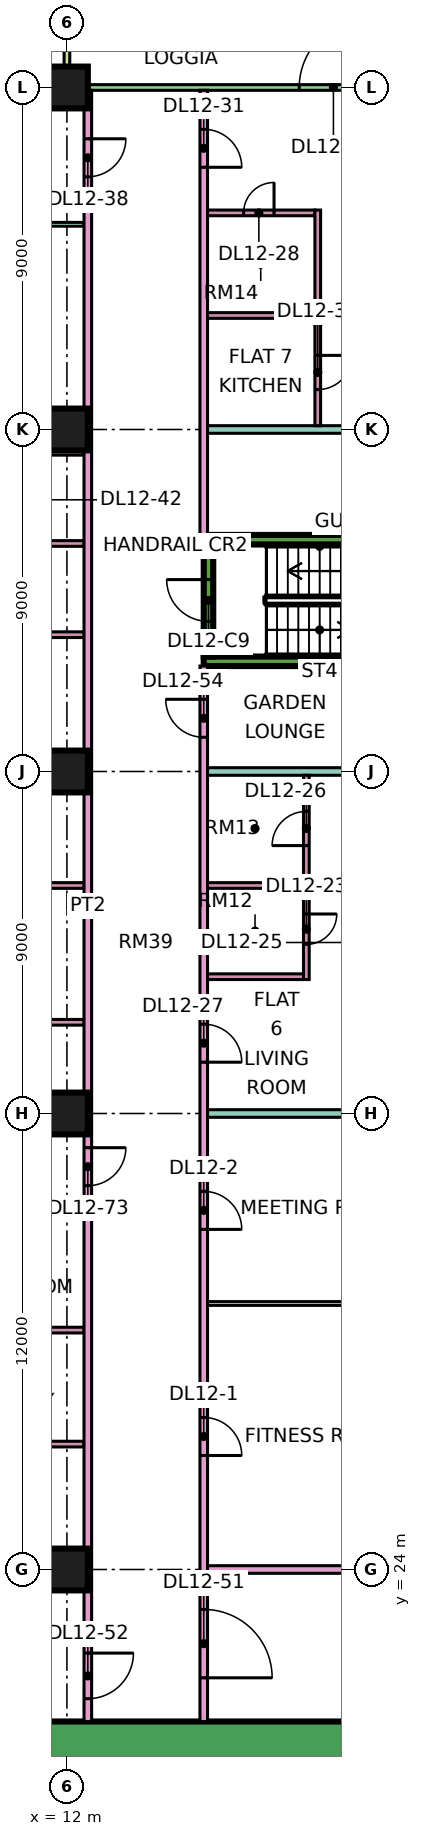
"""IFC4 building model, lengths in metres.
Left out: names, types, materials, properties, quantities, classifications, styles, units other than length and angle.
Written with IfcOpenShell. Run it as: python <this file> out.ifc"""

import sys

from ifc_helpers import new_model, si_unit, direction, frame, frame_2d, origin, origin_2d, place, context, subcontext, project, spatial, rectangle, extrude, element, fill, save


model = new_model("IFC4")
c1 = context("Model", 3, precision=1e-05, world=origin(), true_north=direction((0.0, 1.0)))
c2 = subcontext(c1, "Body", "Model", "MODEL_VIEW")
j1 = project(units=[si_unit("LENGTHUNIT", "METRE"), si_unit("PLANEANGLEUNIT", "RADIAN")], contexts=[c1])
p1 = place(None, origin())
s1 = spatial("IfcSite", under=j1, at=p1, CompositionType="ELEMENT")
p2 = place(p1, origin())
s2 = spatial("IfcBuilding", under=s1, at=p2, CompositionType="ELEMENT")
p3 = place(p2, frame((0.0, 0.0, 60.15)))
s3 = spatial("IfcBuildingStorey", under=s2, at=p3, CompositionType="ELEMENT", Elevation=60.15)
for number, where, z_axis, x_axis in (
    (1, (12.0, 24.0, 0.0), (0.0, 0.0, 1.0), (1.0, 0.0, 0.0)),
    (2, (12.0, 36.0, 0.0), (0.0, 0.0, 1.0), (1.0, 0.0, 0.0)),
    (3, (12.0, 45.0, 0.0), (0.0, 0.0, 1.0), (1.0, 0.0, 0.0)),
    (4, (12.0, 54.0, 0.0), (0.0, 0.0, 1.0), (1.0, 0.0, 0.0)),
    (5, (12.0, 63.0, 0.0), (0.0, 0.0, 1.0), (1.0, 0.0, 0.0)),
):
    element("IfcColumn", number, at=place(p3, frame(where, z_axis=z_axis, x_axis=x_axis)), inside=s3, PredefinedType="COLUMN", context=c2, shape_type="SweptSolid", body=[
        extrude(rectangle(XDim=1.1, YDim=1.1, at=origin_2d()), origin(), (0.0, 0.0, 1.0), 3.75),
    ])
p4 = place(p3, frame((9.0, 19.45, 0.0), z_axis=(0.0, 0.0, 1.0), x_axis=(1.0, 0.0, 0.0)))
e6 = element("IfcWall", 6, at=p4, inside=s3, PredefinedType="SHEAR", context=c2, shape_type="SweptSolid", body=[
    extrude(rectangle(XDim=25.0, YDim=1.1, at=frame_2d((12.5, 0.0))), origin(), (0.0, 0.0, 1.0), 3.75),
])
p5 = place(p4, frame((19.1, 0.0, 0.0)))
e7 = element("IfcOpeningElement", 7, at=p5, cuts=e6, PredefinedType="OPENING", context=c2, shape_type="SweptSolid", body=[
    extrude(rectangle(XDim=1.8, YDim=2.4, at=frame_2d((0.9, 1.2))), frame((0.0, 0.56, 0.0), z_axis=(0.0, -1.0, 0.0), x_axis=(1.0, 0.0, 0.0)), (0.0, 0.0, 1.0), 1.12),
])
for number, where, z_axis, x_axis in (
    (8, (15.6, 47.9, 0.0), (0.0, 0.0, 1.0), (1.0, 0.0, 0.0)),
    (9, (15.6, 51.1, 0.0), (0.0, 0.0, 1.0), (1.0, 0.0, 0.0)),
):
    element("IfcWall", number, at=place(p3, frame(where, z_axis=z_axis, x_axis=x_axis)), inside=s3, PredefinedType="SHEAR", context=c2, shape_type="SweptSolid", body=[
        extrude(rectangle(XDim=7.0, YDim=0.25, at=frame_2d((3.5, 0.0))), origin(), (0.0, 0.0, 1.0), 3.75),
    ])
p6 = place(p3, frame((15.725, 48.025, 0.0), z_axis=(0.0, 0.0, 1.0), x_axis=(0.0, 1.0, 0.0)))
e10 = element("IfcWall", 10, at=p6, inside=s3, PredefinedType="SHEAR", context=c2, shape_type="SweptSolid", body=[
    extrude(rectangle(XDim=2.95, YDim=0.25, at=frame_2d((1.475, 0.0))), origin(), (0.0, 0.0, 1.0), 3.75),
])
p7 = place(p6, frame((0.925, 0.0, 0.0)))
e11 = element("IfcOpeningElement", 11, at=p7, cuts=e10, PredefinedType="OPENING", context=c2, shape_type="SweptSolid", body=[
    extrude(rectangle(XDim=1.1, YDim=2.2, at=frame_2d((0.55, 1.1))), frame((0.0, 0.135, 0.0), z_axis=(0.0, -1.0, 0.0), x_axis=(1.0, 0.0, 0.0)), (0.0, 0.0, 1.0), 0.27),
])
p8 = place(p3, frame((22.425, 63.0, 0.0), z_axis=(0.0, 0.0, 1.0), x_axis=(-1.0, 0.0, 0.0)))
e12 = element("IfcWall", 12, at=p8, inside=s3, PredefinedType="SOLIDWALL", context=c2, shape_type="SweptSolid", body=[
    extrude(rectangle(XDim=10.35, YDim=0.15, at=frame_2d((5.175, 0.0))), origin(), (0.0, 0.0, 1.0), 3.35),
])
p9 = place(p8, frame((2.512, 0.0, 0.0)))
e13 = element("IfcOpeningElement", 13, at=p9, cuts=e12, PredefinedType="OPENING", context=c2, shape_type="SweptSolid", body=[
    extrude(rectangle(XDim=1.8, YDim=2.4, at=frame_2d((0.9, 1.2))), frame((0.0, 0.085, 0.0), z_axis=(0.0, -1.0, 0.0), x_axis=(1.0, 0.0, 0.0)), (0.0, 0.0, 1.0), 0.17),
])
p10 = place(p3, frame((12.0, 64.5, 0.0), z_axis=(0.0, 0.0, 1.0), x_axis=(0.0, -1.0, 0.0)))
e14 = element("IfcWall", 14, at=p10, inside=s3, PredefinedType="SOLIDWALL", context=c2, shape_type="SweptSolid", body=[
    extrude(rectangle(XDim=1.5, YDim=0.15, at=frame_2d((0.75, 0.0))), origin(), (0.0, 0.0, 1.0), 3.35),
])
p11 = place(p3, frame((0.0, 36.0, 0.0), z_axis=(0.0, 0.0, 1.0), x_axis=(1.0, 0.0, 0.0)))
e15 = element("IfcWall", 15, at=p11, inside=s3, PredefinedType="PARTITIONING", context=c2, shape_type="SweptSolid", body=[
    extrude(rectangle(XDim=12.45, YDim=0.2, at=frame_2d((6.225, 0.0))), origin(), (0.0, 0.0, 1.0), 3.35),
])
p12 = place(p3, frame((0.074, 22.4, 0.0), z_axis=(0.0, 0.0, 1.0), x_axis=(1.0, 0.0, 0.0)))
e16 = element("IfcWall", 16, at=p12, inside=s3, PredefinedType="PARTITIONING", context=c2, shape_type="SweptSolid", body=[
    extrude(rectangle(XDim=12.376, YDim=0.2, at=frame_2d((6.188, 0.0))), origin(), (0.0, 0.0, 1.0), 3.35),
])
for number, where, z_axis, x_axis in (
    (17, (7.225, 38.4, 0.0), (0.0, 0.0, 1.0), (1.0, 0.0, 0.0)),
    (18, (7.225, 42.0, 0.0), (0.0, 0.0, 1.0), (1.0, 0.0, 0.0)),
    (19, (7.225, 45.0, 0.0), (0.0, 0.0, 1.0), (1.0, 0.0, 0.0)),
    (20, (7.225, 48.6, 0.0), (0.0, 0.0, 1.0), (1.0, 0.0, 0.0)),
    (21, (7.225, 51.0, 0.0), (0.0, 0.0, 1.0), (1.0, 0.0, 0.0)),
    (22, (7.225, 53.4, 0.0), (0.0, 0.0, 1.0), (1.0, 0.0, 0.0)),
):
    element("IfcWall", number, at=place(p3, frame(where, z_axis=z_axis, x_axis=x_axis)), inside=s3, PredefinedType="PARTITIONING", context=c2, shape_type="SweptSolid", body=[
        extrude(rectangle(XDim=5.225, YDim=0.15, at=frame_2d((2.612, 0.0))), origin(), (0.0, 0.0, 1.0), 3.35),
    ])
p13 = place(p3, frame((7.225, 59.4, 0.0), z_axis=(0.0, 0.0, 1.0), x_axis=(1.0, 0.0, 0.0)))
e23 = element("IfcWall", 23, at=p13, inside=s3, PredefinedType="PARTITIONING", context=c2, shape_type="SweptSolid", body=[
    extrude(rectangle(XDim=5.225, YDim=0.1, at=frame_2d((2.612, 0.0))), origin(), (0.0, 0.0, 1.0), 3.35),
])
for number, where, z_axis, x_axis in (
    (24, (8.425, 27.3, 0.0), (0.0, 0.0, 1.0), (1.0, 0.0, 0.0)),
    (25, (8.425, 30.3, 0.0), (0.0, 0.0, 1.0), (1.0, 0.0, 0.0)),
    (26, (8.425, 33.3, 0.0), (0.0, 0.0, 1.0), (1.0, 0.0, 0.0)),
):
    element("IfcWall", number, at=place(p3, frame(where, z_axis=z_axis, x_axis=x_axis)), inside=s3, PredefinedType="PARTITIONING", context=c2, shape_type="SweptSolid", body=[
        extrude(rectangle(XDim=4.025, YDim=0.15, at=frame_2d((2.012, 0.0))), origin(), (0.0, 0.0, 1.0), 3.35),
    ])
p14 = place(p3, frame((12.55, 20.0, 0.0), z_axis=(0.0, 0.0, 1.0), x_axis=(0.0, 1.0, 0.0)))
e27 = element("IfcWall", 27, at=p14, inside=s3, PredefinedType="PARTITIONING", context=c2, shape_type="SweptSolid", body=[
    extrude(rectangle(XDim=42.926, YDim=0.2, at=frame_2d((21.463, 0.0))), origin(), (0.0, 0.0, 1.0), 3.35),
])
p15 = place(p14, frame((40.65, 0.0, 0.0)))
e28 = element("IfcOpeningElement", 28, at=p15, cuts=e27, PredefinedType="OPENING", context=c2, shape_type="SweptSolid", body=[
    extrude(rectangle(XDim=1.0, YDim=2.1, at=frame_2d((0.5, 1.05))), frame((0.0, 0.11, 0.0), z_axis=(0.0, -1.0, 0.0), x_axis=(1.0, 0.0, 0.0)), (0.0, 0.0, 1.0), 0.22),
])
p16 = place(p14, frame((0.6, 0.0, 0.0)))
e29 = element("IfcOpeningElement", 29, at=p16, cuts=e27, PredefinedType="OPENING", context=c2, shape_type="SweptSolid", body=[
    extrude(rectangle(XDim=1.2, YDim=2.1, at=frame_2d((0.6, 1.05))), frame((0.0, 0.11, 0.0), z_axis=(0.0, -1.0, 0.0), x_axis=(1.0, 0.0, 0.0)), (0.0, 0.0, 1.0), 0.22),
])
p17 = place(p14, frame((14.1, 0.0, 0.0)))
e30 = element("IfcOpeningElement", 30, at=p17, cuts=e27, PredefinedType="OPENING", context=c2, shape_type="SweptSolid", body=[
    extrude(rectangle(XDim=1.0, YDim=2.1, at=frame_2d((0.5, 1.05))), frame((0.0, 0.11, 0.0), z_axis=(0.0, -1.0, 0.0), x_axis=(1.0, 0.0, 0.0)), (0.0, 0.0, 1.0), 0.22),
])
p18 = place(p3, frame((15.6, 20.0, 0.0), z_axis=(0.0, 0.0, 1.0), x_axis=(0.0, 1.0, 0.0)))
e31 = element("IfcWall", 31, at=p18, inside=s3, PredefinedType="PARTITIONING", context=c2, shape_type="SweptSolid", body=[
    extrude(rectangle(XDim=27.775, YDim=0.2, at=frame_2d((13.887, 0.0))), origin(), (0.0, 0.0, 1.0), 3.35),
])
p19 = place(p18, frame((7.0, 0.0, 0.0)))
e32 = element("IfcOpeningElement", 32, at=p19, cuts=e31, PredefinedType="OPENING", context=c2, shape_type="SweptSolid", body=[
    extrude(rectangle(XDim=1.0, YDim=2.1, at=frame_2d((0.5, 1.05))), frame((0.0, 0.11, 0.0), z_axis=(0.0, -1.0, 0.0), x_axis=(1.0, 0.0, 0.0)), (0.0, 0.0, 1.0), 0.22),
])
p20 = place(p18, frame((12.95, 0.0, 0.0)))
e33 = element("IfcOpeningElement", 33, at=p20, cuts=e31, PredefinedType="OPENING", context=c2, shape_type="SweptSolid", body=[
    extrude(rectangle(XDim=1.0, YDim=2.1, at=frame_2d((0.5, 1.05))), frame((0.0, 0.11, 0.0), z_axis=(0.0, -1.0, 0.0), x_axis=(1.0, 0.0, 0.0)), (0.0, 0.0, 1.0), 0.22),
])
p21 = place(p18, frame((17.35, 0.0, 0.0)))
e34 = element("IfcOpeningElement", 34, at=p21, cuts=e31, PredefinedType="OPENING", context=c2, shape_type="SweptSolid", body=[
    extrude(rectangle(XDim=1.0, YDim=2.1, at=frame_2d((0.5, 1.05))), frame((0.0, 0.11, 0.0), z_axis=(0.0, -1.0, 0.0), x_axis=(1.0, 0.0, 0.0)), (0.0, 0.0, 1.0), 0.22),
])
p22 = place(p18, frame((1.15, 0.0, 0.0)))
e35 = element("IfcOpeningElement", 35, at=p22, cuts=e31, PredefinedType="OPENING", context=c2, shape_type="SweptSolid", body=[
    extrude(rectangle(XDim=1.8, YDim=2.1, at=frame_2d((0.9, 1.05))), frame((0.0, 0.11, 0.0), z_axis=(0.0, -1.0, 0.0), x_axis=(1.0, 0.0, 0.0)), (0.0, 0.0, 1.0), 0.22),
])
p23 = place(p18, frame((25.9, 0.0, 0.0)))
e36 = element("IfcOpeningElement", 36, at=p23, cuts=e31, PredefinedType="OPENING", context=c2, shape_type="SweptSolid", body=[
    extrude(rectangle(XDim=1.0, YDim=2.1, at=frame_2d((0.5, 1.05))), frame((0.0, 0.11, 0.0), z_axis=(0.0, -1.0, 0.0), x_axis=(1.0, 0.0, 0.0)), (0.0, 0.0, 1.0), 0.22),
])
p24 = place(p3, frame((15.6, 51.225, 0.0), z_axis=(0.0, 0.0, 1.0), x_axis=(0.0, 1.0, 0.0)))
e37 = element("IfcWall", 37, at=p24, inside=s3, PredefinedType="PARTITIONING", context=c2, shape_type="SweptSolid", body=[
    extrude(rectangle(XDim=11.701, YDim=0.2, at=frame_2d((5.851, 0.0))), origin(), (0.0, 0.0, 1.0), 3.35),
])
p25 = place(p24, frame((9.675, 0.0, 0.0)))
e38 = element("IfcOpeningElement", 38, at=p25, cuts=e37, PredefinedType="OPENING", context=c2, shape_type="SweptSolid", body=[
    extrude(rectangle(XDim=1.0, YDim=2.1, at=frame_2d((0.5, 1.05))), frame((0.0, 0.11, 0.0), z_axis=(0.0, -1.0, 0.0), x_axis=(1.0, 0.0, 0.0)), (0.0, 0.0, 1.0), 0.22),
])
p26 = place(p3, frame((15.7, 24.0, 0.0), z_axis=(0.0, 0.0, 1.0), x_axis=(1.0, 0.0, 0.0)))
e39 = element("IfcWall", 39, at=p26, inside=s3, PredefinedType="PARTITIONING", context=c2, shape_type="SweptSolid", body=[
    extrude(rectangle(XDim=5.8, YDim=0.2, at=frame_2d((2.9, 0.0))), origin(), (0.0, 0.0, 1.0), 3.35),
])
p27 = place(p3, frame((15.7, 31.0, 0.0), z_axis=(0.0, 0.0, 1.0), x_axis=(1.0, 0.0, 0.0)))
e40 = element("IfcWall", 40, at=p27, inside=s3, PredefinedType="PARTITIONING", context=c2, shape_type="SweptSolid", body=[
    extrude(rectangle(XDim=5.8, YDim=0.1, at=frame_2d((2.9, 0.0))), origin(), (0.0, 0.0, 1.0), 3.35),
])
p28 = place(p3, frame((15.7, 36.0, 0.0), z_axis=(0.0, 0.0, 1.0), x_axis=(1.0, 0.0, 0.0)))
e41 = element("IfcWall", 41, at=p28, inside=s3, PredefinedType="PARTITIONING", context=c2, shape_type="SweptSolid", body=[
    extrude(rectangle(XDim=8.3, YDim=0.2, at=frame_2d((4.15, 0.0))), origin(), (0.0, 0.0, 1.0), 3.35),
])
for number, where, z_axis, x_axis in (
    (42, (15.7, 39.6, 0.0), (0.0, 0.0, 1.0), (1.0, 0.0, 0.0)),
    (43, (15.7, 42.0, 0.0), (0.0, 0.0, 1.0), (1.0, 0.0, 0.0)),
):
    element("IfcWall", number, at=place(p3, frame(where, z_axis=z_axis, x_axis=x_axis)), inside=s3, PredefinedType="PARTITIONING", context=c2, shape_type="SweptSolid", body=[
        extrude(rectangle(XDim=2.525, YDim=0.15, at=frame_2d((1.263, 0.0))), origin(), (0.0, 0.0, 1.0), 3.35),
    ])
p29 = place(p3, frame((15.7, 45.0, 0.0), z_axis=(0.0, 0.0, 1.0), x_axis=(1.0, 0.0, 0.0)))
e44 = element("IfcWall", 44, at=p29, inside=s3, PredefinedType="PARTITIONING", context=c2, shape_type="SweptSolid", body=[
    extrude(rectangle(XDim=8.226, YDim=0.2, at=frame_2d((4.113, 0.0))), origin(), (0.0, 0.0, 1.0), 3.35),
])
p30 = place(p3, frame((15.7, 54.0, 0.0), z_axis=(0.0, 0.0, 1.0), x_axis=(1.0, 0.0, 0.0)))
e45 = element("IfcWall", 45, at=p30, inside=s3, PredefinedType="PARTITIONING", context=c2, shape_type="SweptSolid", body=[
    extrude(rectangle(XDim=8.3, YDim=0.2, at=frame_2d((4.15, 0.0))), origin(), (0.0, 0.0, 1.0), 3.35),
])
p31 = place(p3, frame((15.7, 57.0, 0.0), z_axis=(0.0, 0.0, 1.0), x_axis=(1.0, 0.0, 0.0)))
e46 = element("IfcWall", 46, at=p31, inside=s3, PredefinedType="PARTITIONING", context=c2, shape_type="SweptSolid", body=[
    extrude(rectangle(XDim=2.825, YDim=0.15, at=frame_2d((1.413, 0.0))), origin(), (0.0, 0.0, 1.0), 3.35),
])
p32 = place(p3, frame((15.7, 59.7, 0.0), z_axis=(0.0, 0.0, 1.0), x_axis=(1.0, 0.0, 0.0)))
e47 = element("IfcWall", 47, at=p32, inside=s3, PredefinedType="PARTITIONING", context=c2, shape_type="SweptSolid", body=[
    extrude(rectangle(XDim=2.825, YDim=0.15, at=frame_2d((1.413, 0.0))), origin(), (0.0, 0.0, 1.0), 3.35),
])
p33 = place(p32, frame((0.95, 0.0, 0.0)))
e48 = element("IfcOpeningElement", 48, at=p33, cuts=e47, PredefinedType="OPENING", context=c2, shape_type="SweptSolid", body=[
    extrude(rectangle(XDim=0.8, YDim=2.1, at=frame_2d((0.4, 1.05))), frame((0.0, 0.085, 0.0), z_axis=(0.0, -1.0, 0.0), x_axis=(1.0, 0.0, 0.0)), (0.0, 0.0, 1.0), 0.17),
])
p34 = place(p3, frame((18.3, 39.525, 0.0), z_axis=(0.0, 0.0, 1.0), x_axis=(0.0, 1.0, 0.0)))
e49 = element("IfcWall", 49, at=p34, inside=s3, PredefinedType="PARTITIONING", context=c2, shape_type="SweptSolid", body=[
    extrude(rectangle(XDim=5.375, YDim=0.15, at=frame_2d((2.688, 0.0))), origin(), (0.0, 0.0, 1.0), 3.35),
])
p35 = place(p34, frame((0.925, 0.0, 0.0)))
e50 = element("IfcOpeningElement", 50, at=p35, cuts=e49, PredefinedType="OPENING", context=c2, shape_type="SweptSolid", body=[
    extrude(rectangle(XDim=0.8, YDim=2.1, at=frame_2d((0.4, 1.05))), frame((0.0, 0.085, 0.0), z_axis=(0.0, -1.0, 0.0), x_axis=(1.0, 0.0, 0.0)), (0.0, 0.0, 1.0), 0.17),
])
p36 = place(p34, frame((3.525, 0.0, 0.0)))
e51 = element("IfcOpeningElement", 51, at=p36, cuts=e49, PredefinedType="OPENING", context=c2, shape_type="SweptSolid", body=[
    extrude(rectangle(XDim=0.9, YDim=2.1, at=frame_2d((0.45, 1.05))), frame((0.0, 0.085, 0.0), z_axis=(0.0, -1.0, 0.0), x_axis=(1.0, 0.0, 0.0)), (0.0, 0.0, 1.0), 0.17),
])
p37 = place(p3, frame((18.6, 54.1, 0.0), z_axis=(0.0, 0.0, 1.0), x_axis=(0.0, 1.0, 0.0)))
e52 = element("IfcWall", 52, at=p37, inside=s3, PredefinedType="PARTITIONING", context=c2, shape_type="SweptSolid", body=[
    extrude(rectangle(XDim=5.675, YDim=0.15, at=frame_2d((2.837, 0.0))), origin(), (0.0, 0.0, 1.0), 3.35),
])
p38 = place(p37, frame((0.95, 0.0, 0.0)))
e53 = element("IfcOpeningElement", 53, at=p38, cuts=e52, PredefinedType="OPENING", context=c2, shape_type="SweptSolid", body=[
    extrude(rectangle(XDim=0.9, YDim=2.1, at=frame_2d((0.45, 1.05))), frame((0.0, 0.085, 0.0), z_axis=(0.0, -1.0, 0.0), x_axis=(1.0, 0.0, 0.0)), (0.0, 0.0, 1.0), 0.17),
])
p39 = place(p9, frame((1.8, 0.0, 0.0), z_axis=(0.0, 0.0, 1.0), x_axis=(-1.0, 0.0, 0.0)))
e54 = element("IfcDoor", 54, at=p39, inside=s3, OperationType="DOUBLE_DOOR_SINGLE_SWING", PredefinedType="DOOR", context=c2, shape_type="SweptSolid", body=[
    extrude(rectangle(XDim=1.8, YDim=2.4, at=frame_2d((0.9, 1.2))), frame((0.0, 0.025, 0.0), z_axis=(0.0, -1.0, 0.0), x_axis=(1.0, 0.0, 0.0)), (0.0, 0.0, 1.0), 0.05),
])
fill(e13, e54)
p40 = place(p7, frame((1.1, 0.0, 0.0), z_axis=(0.0, 0.0, 1.0), x_axis=(-1.0, 0.0, 0.0)))
e55 = element("IfcDoor", 55, at=p40, inside=s3, OperationType="SINGLE_SWING_RIGHT", PredefinedType="DOOR", context=c2, shape_type="SweptSolid", body=[
    extrude(rectangle(XDim=1.1, YDim=2.2, at=frame_2d((0.55, 1.1))), frame((0.0, 0.025, 0.0), z_axis=(0.0, -1.0, 0.0), x_axis=(1.0, 0.0, 0.0)), (0.0, 0.0, 1.0), 0.05),
])
fill(e11, e55)
p41 = place(p19, frame((1.0, 0.0, 0.0), z_axis=(0.0, 0.0, 1.0), x_axis=(-1.0, 0.0, 0.0)))
e56 = element("IfcDoor", 56, at=p41, inside=s3, OperationType="SINGLE_SWING_LEFT", PredefinedType="DOOR", context=c2, shape_type="SweptSolid", body=[
    extrude(rectangle(XDim=1.0, YDim=2.1, at=frame_2d((0.5, 1.05))), frame((0.0, 0.025, 0.0), z_axis=(0.0, -1.0, 0.0), x_axis=(1.0, 0.0, 0.0)), (0.0, 0.0, 1.0), 0.05),
])
fill(e32, e56)
p42 = place(p20, frame((1.0, 0.0, 0.0), z_axis=(0.0, 0.0, 1.0), x_axis=(-1.0, 0.0, 0.0)))
e57 = element("IfcDoor", 57, at=p42, inside=s3, OperationType="SINGLE_SWING_LEFT", PredefinedType="DOOR", context=c2, shape_type="SweptSolid", body=[
    extrude(rectangle(XDim=1.0, YDim=2.1, at=frame_2d((0.5, 1.05))), frame((0.0, 0.025, 0.0), z_axis=(0.0, -1.0, 0.0), x_axis=(1.0, 0.0, 0.0)), (0.0, 0.0, 1.0), 0.05),
])
fill(e33, e57)
p43 = place(p35, origin())
e58 = element("IfcDoor", 58, at=p43, inside=s3, OperationType="SINGLE_SWING_RIGHT", PredefinedType="DOOR", context=c2, shape_type="SweptSolid", body=[
    extrude(rectangle(XDim=0.8, YDim=2.1, at=frame_2d((0.4, 1.05))), frame((0.0, 0.025, 0.0), z_axis=(0.0, -1.0, 0.0), x_axis=(1.0, 0.0, 0.0)), (0.0, 0.0, 1.0), 0.05),
])
fill(e50, e58)
p44 = place(p36, origin())
e59 = element("IfcDoor", 59, at=p44, inside=s3, OperationType="SINGLE_SWING_LEFT", PredefinedType="DOOR", context=c2, shape_type="SweptSolid", body=[
    extrude(rectangle(XDim=0.9, YDim=2.1, at=frame_2d((0.45, 1.05))), frame((0.0, 0.025, 0.0), z_axis=(0.0, -1.0, 0.0), x_axis=(1.0, 0.0, 0.0)), (0.0, 0.0, 1.0), 0.05),
])
fill(e51, e59)
p45 = place(p21, frame((1.0, 0.0, 0.0), z_axis=(0.0, 0.0, 1.0), x_axis=(-1.0, 0.0, 0.0)))
e60 = element("IfcDoor", 60, at=p45, inside=s3, OperationType="SINGLE_SWING_LEFT", PredefinedType="DOOR", context=c2, shape_type="SweptSolid", body=[
    extrude(rectangle(XDim=1.0, YDim=2.1, at=frame_2d((0.5, 1.05))), frame((0.0, 0.025, 0.0), z_axis=(0.0, -1.0, 0.0), x_axis=(1.0, 0.0, 0.0)), (0.0, 0.0, 1.0), 0.05),
])
fill(e34, e60)
p46 = place(p33, frame((0.8, 0.0, 0.0), z_axis=(0.0, 0.0, 1.0), x_axis=(-1.0, 0.0, 0.0)))
e61 = element("IfcDoor", 61, at=p46, inside=s3, OperationType="SINGLE_SWING_RIGHT", PredefinedType="DOOR", context=c2, shape_type="SweptSolid", body=[
    extrude(rectangle(XDim=0.8, YDim=2.1, at=frame_2d((0.4, 1.05))), frame((0.0, 0.025, 0.0), z_axis=(0.0, -1.0, 0.0), x_axis=(1.0, 0.0, 0.0)), (0.0, 0.0, 1.0), 0.05),
])
fill(e48, e61)
p47 = place(p38, origin())
e62 = element("IfcDoor", 62, at=p47, inside=s3, OperationType="SINGLE_SWING_RIGHT", PredefinedType="DOOR", context=c2, shape_type="SweptSolid", body=[
    extrude(rectangle(XDim=0.9, YDim=2.1, at=frame_2d((0.45, 1.05))), frame((0.0, 0.025, 0.0), z_axis=(0.0, -1.0, 0.0), x_axis=(1.0, 0.0, 0.0)), (0.0, 0.0, 1.0), 0.05),
])
fill(e53, e62)
p48 = place(p25, frame((1.0, 0.0, 0.0), z_axis=(0.0, 0.0, 1.0), x_axis=(-1.0, 0.0, 0.0)))
e63 = element("IfcDoor", 63, at=p48, inside=s3, OperationType="SINGLE_SWING_LEFT", PredefinedType="DOOR", context=c2, shape_type="SweptSolid", body=[
    extrude(rectangle(XDim=1.0, YDim=2.1, at=frame_2d((0.5, 1.05))), frame((0.0, 0.025, 0.0), z_axis=(0.0, -1.0, 0.0), x_axis=(1.0, 0.0, 0.0)), (0.0, 0.0, 1.0), 0.05),
])
fill(e38, e63)
p49 = place(p15, origin())
e64 = element("IfcDoor", 64, at=p49, inside=s3, OperationType="SINGLE_SWING_RIGHT", PredefinedType="DOOR", context=c2, shape_type="SweptSolid", body=[
    extrude(rectangle(XDim=1.0, YDim=2.1, at=frame_2d((0.5, 1.05))), frame((0.0, 0.025, 0.0), z_axis=(0.0, -1.0, 0.0), x_axis=(1.0, 0.0, 0.0)), (0.0, 0.0, 1.0), 0.05),
])
fill(e28, e64)
p50 = place(p22, frame((1.8, 0.0, 0.0), z_axis=(0.0, 0.0, 1.0), x_axis=(-1.0, 0.0, 0.0)))
e65 = element("IfcDoor", 65, at=p50, inside=s3, OperationType="DOUBLE_DOOR_SINGLE_SWING", PredefinedType="DOOR", context=c2, shape_type="SweptSolid", body=[
    extrude(rectangle(XDim=1.8, YDim=2.1, at=frame_2d((0.9, 1.05))), frame((0.0, 0.025, 0.0), z_axis=(0.0, -1.0, 0.0), x_axis=(1.0, 0.0, 0.0)), (0.0, 0.0, 1.0), 0.05),
])
fill(e35, e65)
p51 = place(p16, origin())
e66 = element("IfcDoor", 66, at=p51, inside=s3, OperationType="SINGLE_SWING_RIGHT", PredefinedType="DOOR", context=c2, shape_type="SweptSolid", body=[
    extrude(rectangle(XDim=1.2, YDim=2.1, at=frame_2d((0.6, 1.05))), frame((0.0, 0.025, 0.0), z_axis=(0.0, -1.0, 0.0), x_axis=(1.0, 0.0, 0.0)), (0.0, 0.0, 1.0), 0.05),
])
fill(e29, e66)
p52 = place(p23, frame((1.0, 0.0, 0.0), z_axis=(0.0, 0.0, 1.0), x_axis=(-1.0, 0.0, 0.0)))
e67 = element("IfcDoor", 67, at=p52, inside=s3, OperationType="SINGLE_SWING_RIGHT", PredefinedType="DOOR", context=c2, shape_type="SweptSolid", body=[
    extrude(rectangle(XDim=1.0, YDim=2.1, at=frame_2d((0.5, 1.05))), frame((0.0, 0.025, 0.0), z_axis=(0.0, -1.0, 0.0), x_axis=(1.0, 0.0, 0.0)), (0.0, 0.0, 1.0), 0.05),
])
fill(e36, e67)
p53 = place(p17, origin())
e68 = element("IfcDoor", 68, at=p53, inside=s3, OperationType="SINGLE_SWING_RIGHT", PredefinedType="DOOR", context=c2, shape_type="SweptSolid", body=[
    extrude(rectangle(XDim=1.0, YDim=2.1, at=frame_2d((0.5, 1.05))), frame((0.0, 0.025, 0.0), z_axis=(0.0, -1.0, 0.0), x_axis=(1.0, 0.0, 0.0)), (0.0, 0.0, 1.0), 0.05),
])
fill(e30, e68)
save(model, sys.argv[1])
